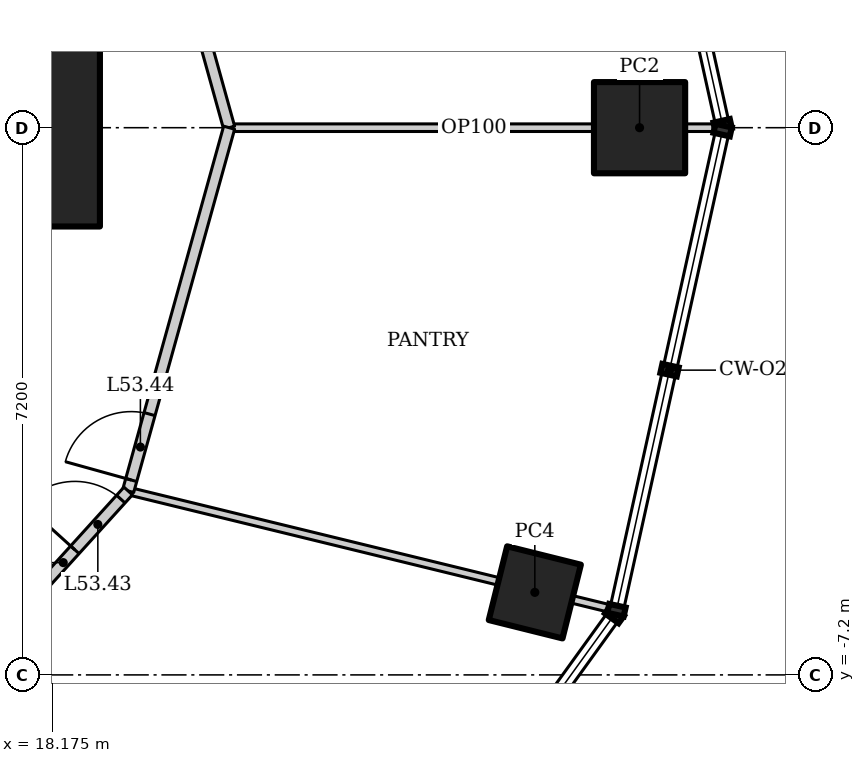
"""IFC4 building model, lengths in metres.
Left out: names, types, materials, properties, quantities, classifications, styles, units other than length and angle.
Written with IfcOpenShell. Run it as: python <this file> out.ifc"""

import sys

from ifc_helpers import new_model, si_unit, direction, frame, frame_2d, origin, origin_2d, place, context, subcontext, project, spatial, rectangle, hollow_rectangle, extrude, element, fill, save


model = new_model("IFC4")
c1 = context("Model", 3, precision=1e-05, world=origin(), true_north=direction((0.0, 1.0)))
c2 = subcontext(c1, "Body", "Model", "MODEL_VIEW")
j1 = project(units=[si_unit("LENGTHUNIT", "METRE"), si_unit("PLANEANGLEUNIT", "RADIAN")], contexts=[c1])
p1 = place(None, origin())
s1 = spatial("IfcSite", under=j1, at=p1, CompositionType="ELEMENT")
p2 = place(p1, origin())
s2 = spatial("IfcBuilding", under=s1, at=p2, CompositionType="ELEMENT")
p3 = place(p2, frame((0.0, 0.0, 228.4)))
s3 = spatial("IfcBuildingStorey", under=s2, at=p3, CompositionType="ELEMENT", Elevation=228.4)
p4 = place(p3, frame((17.5, 0.0, 0.0), z_axis=(0.0, 0.0, 1.0), x_axis=(1.0, 0.0, 0.0)))
e1 = element("IfcColumn", 1, at=p4, inside=s3, PredefinedType="COLUMN", context=c2, shape_type="SweptSolid", body=[
    extrude(hollow_rectangle(XDim=2.6, YDim=2.6, WallThickness=0.13, at=origin_2d()), origin(), (0.0, 0.0, 1.0), 4.2),
])
p5 = place(p3, frame((25.9, 0.0, 0.0), z_axis=(0.0, 0.0, 1.0), x_axis=(1.0, 0.0, 0.0)))
e2 = element("IfcColumn", 2, at=p5, inside=s3, PredefinedType="COLUMN", context=c2, shape_type="SweptSolid", body=[
    extrude(hollow_rectangle(XDim=1.2, YDim=1.2, WallThickness=0.1, at=origin_2d()), origin(), (0.0, 0.0, 1.0), 4.2),
])
p6 = place(p3, frame((24.522, -6.114, 0.0), z_axis=(0.0, 0.0, 1.0), x_axis=(0.2419218956, 0.970295726276, 0.0)))
e3 = element("IfcColumn", 3, at=p6, inside=s3, PredefinedType="COLUMN", context=c2, shape_type="SweptSolid", body=[
    extrude(hollow_rectangle(XDim=1.0, YDim=1.0, WallThickness=0.08, at=origin_2d()), origin(), (0.0, 0.0, 1.0), 4.2),
])
p7 = place(p3, frame((26.944, 0.0, 0.0), z_axis=(0.0, 0.0, 1.0), x_axis=(-1.0, 0.0, 0.0)))
e4 = element("IfcWall", 4, at=p7, inside=s3, PredefinedType="PARTITIONING", context=c2, shape_type="SweptSolid", body=[
    extrude(rectangle(XDim=6.444, YDim=0.1, at=frame_2d((3.222, 0.0))), origin(), (0.0, 0.0, 1.0), 3.349),
])
p8 = place(p3, frame((25.543, -6.335, 0.0), z_axis=(0.0, 0.0, 1.0), x_axis=(-0.971467850621, 0.237171278215, 0.0)))
e5 = element("IfcWall", 5, at=p8, inside=s3, PredefinedType="PARTITIONING", context=c2, shape_type="SweptSolid", body=[
    extrude(rectangle(XDim=6.558, YDim=0.1, at=frame_2d((3.279, 0.0))), origin(), (0.0, 0.0, 1.0), 3.108),
])
p9 = place(p3, frame((20.5, 0.0, 0.0), z_axis=(0.0, 0.0, 1.0), x_axis=(-0.26770731566, 0.963500281859, 0.0)))
e6 = element("IfcWall", 6, at=p9, inside=s3, PredefinedType="PARTITIONING", context=c2, shape_type="SweptSolid", body=[
    extrude(rectangle(XDim=4.961, YDim=0.15, at=frame_2d((2.48, 0.0))), origin(), (0.0, 0.0, 1.0), 4.05),
])
p10 = place(p3, frame((19.172, -4.78, 0.0), z_axis=(0.0, 0.0, 1.0), x_axis=(0.26770731566, 0.963500281859, 0.0)))
e7 = element("IfcWall", 7, at=p10, inside=s3, PredefinedType="PARTITIONING", context=c2, shape_type="SweptSolid", body=[
    extrude(rectangle(XDim=4.961, YDim=0.15, at=frame_2d((2.48, 0.0))), origin(), (0.0, 0.0, 1.0), 4.05),
])
p11 = place(p10, frame((0.15, 0.0, 0.0)))
e8 = element("IfcOpeningElement", 8, at=p11, cuts=e7, PredefinedType="OPENING", context=c2, shape_type="SweptSolid", body=[
    extrude(rectangle(XDim=0.9, YDim=2.1, at=frame_2d((0.45, 1.05))), frame((0.0, 0.085, 0.0), z_axis=(0.0, -1.0, 0.0), x_axis=(1.0, 0.0, 0.0)), (0.0, 0.0, 1.0), 0.17),
])
p12 = place(p3, frame((17.463, -6.665, 0.0), z_axis=(0.0, 0.0, 1.0), x_axis=(0.671721890643, 0.74080341632, 0.0)))
e9 = element("IfcWall", 9, at=p12, inside=s3, PredefinedType="PARTITIONING", context=c2, shape_type="SweptSolid", body=[
    extrude(rectangle(XDim=2.544, YDim=0.15, at=frame_2d((1.272, 0.0))), origin(), (0.0, 0.0, 1.0), 4.05),
])
p13 = place(p12, frame((1.5, 0.0, 0.0)))
e10 = element("IfcOpeningElement", 10, at=p13, cuts=e9, PredefinedType="OPENING", context=c2, shape_type="SweptSolid", body=[
    extrude(rectangle(XDim=0.9, YDim=2.1, at=frame_2d((0.45, 1.05))), frame((0.0, 0.085, 0.0), z_axis=(0.0, -1.0, 0.0), x_axis=(1.0, 0.0, 0.0)), (0.0, 0.0, 1.0), 0.17),
])
p14 = place(p13, origin())
e11 = element("IfcDoor", 11, at=p14, inside=s3, OperationType="SINGLE_SWING_LEFT", PredefinedType="DOOR", context=c2, shape_type="SweptSolid", body=[
    extrude(rectangle(XDim=0.9, YDim=2.1, at=frame_2d((0.45, 1.05))), frame((0.0, 0.025, 0.0), z_axis=(0.0, -1.0, 0.0), x_axis=(1.0, 0.0, 0.0)), (0.0, 0.0, 1.0), 0.05),
])
fill(e10, e11)
p15 = place(p11, origin())
e12 = element("IfcDoor", 12, at=p15, inside=s3, OperationType="SINGLE_SWING_LEFT", PredefinedType="DOOR", context=c2, shape_type="SweptSolid", body=[
    extrude(rectangle(XDim=0.9, YDim=2.1, at=frame_2d((0.45, 1.05))), frame((0.0, 0.025, 0.0), z_axis=(0.0, -1.0, 0.0), x_axis=(1.0, 0.0, 0.0)), (0.0, 0.0, 1.0), 0.05),
])
fill(e8, e12)
save(model, sys.argv[1])
